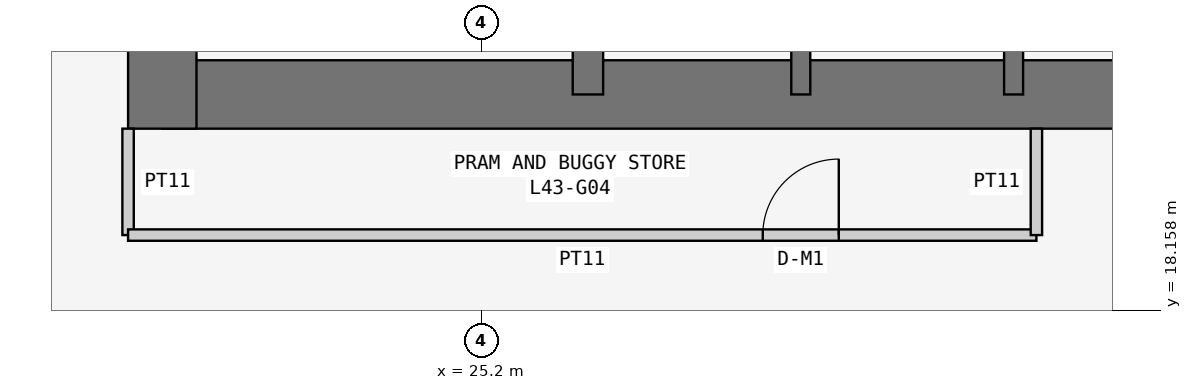
"""IFC4 building model, lengths in metres.
Left out: names, types, materials, properties, quantities, classifications, styles, units other than length and angle.
Written with IfcOpenShell. Run it as: python <this file> out.ifc"""

import sys

from ifc_helpers import new_model, si_unit, direction, frame, frame_2d, origin, place, context, subcontext, project, spatial, rectangle, extrude, element, fill, save


model = new_model("IFC4")
c1 = context("Model", 3, precision=1e-05, world=origin(), true_north=direction((0.0, 1.0)))
c2 = subcontext(c1, "Body", "Model", "MODEL_VIEW")
j1 = project(units=[si_unit("LENGTHUNIT", "METRE"), si_unit("PLANEANGLEUNIT", "RADIAN")], contexts=[c1])
p1 = place(None, origin())
s1 = spatial("IfcSite", under=j1, at=p1, CompositionType="ELEMENT")
p2 = place(p1, origin())
s2 = spatial("IfcBuilding", under=s1, at=p2, CompositionType="ELEMENT")
p3 = place(p2, frame((0.0, 0.0, 166.5)))
s3 = spatial("IfcBuildingStorey", under=s2, at=p3, CompositionType="ELEMENT", Elevation=166.5)
p4 = place(p3, frame((21.0, 21.0, 0.0), z_axis=(0.0, 0.0, 1.0), x_axis=(1.0, 0.0, 0.0)))
e1 = element("IfcWall", 1, at=p4, inside=s3, PredefinedType="SHEAR", context=c2, shape_type="SweptSolid", body=[
    extrude(rectangle(XDim=17.25, YDim=0.9, at=frame_2d((8.625, 0.0))), origin(), (0.0, 0.0, 1.0), 3.6),
])
p5 = place(p3, frame((21.0, 37.8, 0.0), z_axis=(0.0, 0.0, 1.0), x_axis=(0.0, -1.0, 0.0)))
e2 = element("IfcWall", 2, at=p5, inside=s3, PredefinedType="SHEAR", context=c2, shape_type="SweptSolid", body=[
    extrude(rectangle(XDim=17.25, YDim=0.9, at=frame_2d((8.625, 0.0))), origin(), (0.0, 0.0, 1.0), 3.6),
])
p6 = place(p5, frame((5.4, 0.0, 0.0)))
e3 = element("IfcOpeningElement", 3, at=p6, cuts=e2, PredefinedType="OPENING", context=c2, shape_type="SweptSolid", body=[
    extrude(rectangle(XDim=1.2, YDim=2.1, at=frame_2d((0.6, 1.05))), frame((0.0, 0.46, 0.0), z_axis=(0.0, -1.0, 0.0), x_axis=(1.0, 0.0, 0.0)), (0.0, 0.0, 1.0), 0.92),
])
p7 = place(p3, frame((26.6, 21.0, 0.0), z_axis=(0.0, 0.0, 1.0), x_axis=(0.0, 1.0, 0.0)))
e4 = element("IfcWall", 4, at=p7, inside=s3, PredefinedType="SHEAR", context=c2, shape_type="SweptSolid", body=[
    extrude(rectangle(XDim=16.8, YDim=0.4, at=frame_2d((8.4, 0.0))), origin(), (0.0, 0.0, 1.0), 3.6),
])
p8 = place(p7, frame((10.4, 0.0, 0.0)))
e5 = element("IfcOpeningElement", 5, at=p8, cuts=e4, PredefinedType="OPENING", context=c2, shape_type="SweptSolid", body=[
    extrude(rectangle(XDim=1.2, YDim=2.1, at=frame_2d((0.6, 1.05))), frame((0.0, 0.21, 0.0), z_axis=(0.0, -1.0, 0.0), x_axis=(1.0, 0.0, 0.0)), (0.0, 0.0, 1.0), 0.42),
])
for number, where, z_axis, x_axis in (
    (6, (29.4, 21.0, 0.0), (0.0, 0.0, 1.0), (0.0, 1.0, 0.0)),
    (7, (32.2, 21.0, 0.0), (0.0, 0.0, 1.0), (0.0, 1.0, 0.0)),
):
    element("IfcWall", number, at=place(p3, frame(where, z_axis=z_axis, x_axis=x_axis)), inside=s3, PredefinedType="SHEAR", context=c2, shape_type="SweptSolid", body=[
        extrude(rectangle(XDim=3.2, YDim=0.25, at=frame_2d((1.6, 0.0))), origin(), (0.0, 0.0, 1.0), 3.6),
    ])
p9 = place(p3, frame((20.55, 20.55, 0.0), z_axis=(0.0, 0.0, 1.0), x_axis=(0.0, -1.0, 0.0)))
e8 = element("IfcWall", 8, at=p9, inside=s3, PredefinedType="PARTITIONING", context=c2, shape_type="SweptSolid", body=[
    extrude(rectangle(XDim=1.4, YDim=0.15, at=frame_2d((0.7, 0.0))), origin(), (0.0, 0.0, 1.0), 3.45),
])
p10 = place(p3, frame((20.55, 19.15, 0.0), z_axis=(0.0, 0.0, 1.0), x_axis=(1.0, 0.0, 0.0)))
e9 = element("IfcWall", 9, at=p10, inside=s3, PredefinedType="PARTITIONING", context=c2, shape_type="SweptSolid", body=[
    extrude(rectangle(XDim=11.95, YDim=0.15, at=frame_2d((5.975, 0.0))), origin(), (0.0, 0.0, 1.0), 3.45),
])
p11 = place(p10, frame((8.35, 0.0, 0.0)))
e10 = element("IfcOpeningElement", 10, at=p11, cuts=e9, PredefinedType="OPENING", context=c2, shape_type="SweptSolid", body=[
    extrude(rectangle(XDim=1.0, YDim=2.1, at=frame_2d((0.5, 1.05))), frame((0.0, 0.085, 0.0), z_axis=(0.0, -1.0, 0.0), x_axis=(1.0, 0.0, 0.0)), (0.0, 0.0, 1.0), 0.17),
])
p12 = place(p3, frame((32.5, 19.15, 0.0), z_axis=(0.0, 0.0, 1.0), x_axis=(0.0, 1.0, 0.0)))
e11 = element("IfcWall", 11, at=p12, inside=s3, PredefinedType="PARTITIONING", context=c2, shape_type="SweptSolid", body=[
    extrude(rectangle(XDim=1.4, YDim=0.15, at=frame_2d((0.7, 0.0))), origin(), (0.0, 0.0, 1.0), 3.45),
])
p13 = place(p11, origin())
e12 = element("IfcDoor", 12, at=p13, inside=s3, OperationType="SINGLE_SWING_RIGHT", PredefinedType="DOOR", context=c2, shape_type="SweptSolid", body=[
    extrude(rectangle(XDim=1.0, YDim=2.1, at=frame_2d((0.5, 1.05))), frame((0.0, 0.025, 0.0), z_axis=(0.0, -1.0, 0.0), x_axis=(1.0, 0.0, 0.0)), (0.0, 0.0, 1.0), 0.05),
])
fill(e10, e12)
save(model, sys.argv[1])
